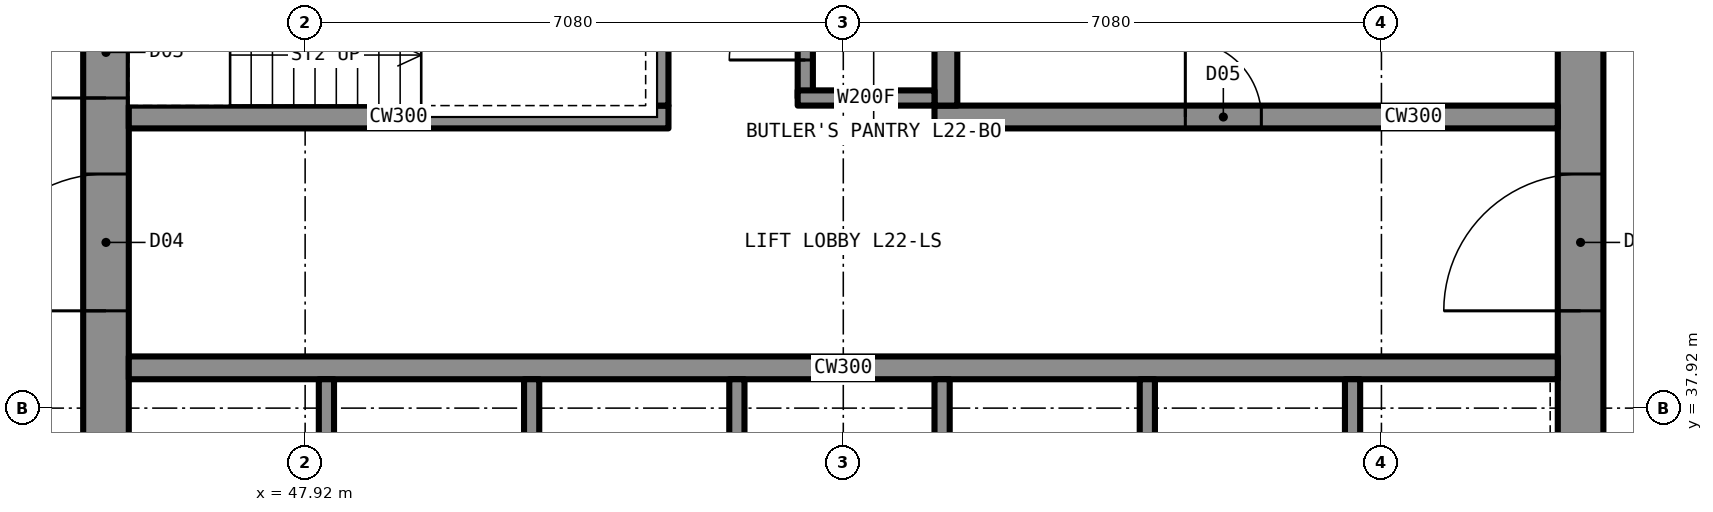
"""IFC4 building model, lengths in metres.
Left out: names, types, materials, properties, quantities, classifications, styles, units other than length and angle.
Written with IfcOpenShell. Run it as: python <this file> out.ifc"""

import sys

from ifc_helpers import new_model, si_unit, direction, frame, frame_2d, origin, place, context, subcontext, project, spatial, rectangle, extrude, element, fill, save


model = new_model("IFC4")
c1 = context("Model", 3, precision=1e-05, world=origin(), true_north=direction((0.0, 1.0)))
c2 = subcontext(c1, "Body", "Model", "MODEL_VIEW")
j1 = project(units=[si_unit("LENGTHUNIT", "METRE"), si_unit("PLANEANGLEUNIT", "RADIAN")], contexts=[c1])
p1 = place(None, origin())
s1 = spatial("IfcSite", under=j1, at=p1, CompositionType="ELEMENT")
p2 = place(p1, origin())
s2 = spatial("IfcBuilding", under=s1, at=p2, CompositionType="ELEMENT")
p3 = place(p2, frame((0.0, 0.0, 81.0)))
s3 = spatial("IfcBuildingStorey", under=s2, at=p3, CompositionType="ELEMENT", Elevation=81.0)
p4 = place(p3, frame((64.7, 35.6, 0.0), z_axis=(0.0, 0.0, 1.0), x_axis=(0.0, 1.0, 0.0)))
e1 = element("IfcWall", 1, at=p4, inside=s3, PredefinedType="SHEAR", context=c2, shape_type="SweptSolid", body=[
    extrude(rectangle(XDim=18.8, YDim=0.6, at=frame_2d((9.4, 0.0))), origin(), (0.0, 0.0, 1.0), 3.5),
])
p5 = place(p4, frame((13.4, 0.0, 0.0)))
e2 = element("IfcOpeningElement", 2, at=p5, cuts=e1, PredefinedType="OPENING", context=c2, shape_type="SweptSolid", body=[
    extrude(rectangle(XDim=1.8, YDim=2.2, at=frame_2d((0.9, 1.1))), frame((0.0, 0.31, 0.0), z_axis=(0.0, -1.0, 0.0), x_axis=(1.0, 0.0, 0.0)), (0.0, 0.0, 1.0), 0.62),
])
p6 = place(p4, frame((3.6, 0.0, 0.0)))
e3 = element("IfcOpeningElement", 3, at=p6, cuts=e1, PredefinedType="OPENING", context=c2, shape_type="SweptSolid", body=[
    extrude(rectangle(XDim=1.8, YDim=2.2, at=frame_2d((0.9, 1.1))), frame((0.0, 0.31, 0.0), z_axis=(0.0, -1.0, 0.0), x_axis=(1.0, 0.0, 0.0)), (0.0, 0.0, 1.0), 0.62),
])
p7 = place(p3, frame((45.3, 35.6, 0.0), z_axis=(0.0, 0.0, 1.0), x_axis=(0.0, 1.0, 0.0)))
e4 = element("IfcWall", 4, at=p7, inside=s3, PredefinedType="SHEAR", context=c2, shape_type="SweptSolid", body=[
    extrude(rectangle(XDim=18.8, YDim=0.6, at=frame_2d((9.4, 0.0))), origin(), (0.0, 0.0, 1.0), 3.5),
])
p8 = place(p7, frame((13.4, 0.0, 0.0)))
e5 = element("IfcOpeningElement", 5, at=p8, cuts=e4, PredefinedType="OPENING", context=c2, shape_type="SweptSolid", body=[
    extrude(rectangle(XDim=1.8, YDim=2.2, at=frame_2d((0.9, 1.1))), frame((0.0, 0.31, 0.0), z_axis=(0.0, -1.0, 0.0), x_axis=(1.0, 0.0, 0.0)), (0.0, 0.0, 1.0), 0.62),
])
p9 = place(p7, frame((3.6, 0.0, 0.0)))
e6 = element("IfcOpeningElement", 6, at=p9, cuts=e4, PredefinedType="OPENING", context=c2, shape_type="SweptSolid", body=[
    extrude(rectangle(XDim=1.8, YDim=2.2, at=frame_2d((0.9, 1.1))), frame((0.0, 0.31, 0.0), z_axis=(0.0, -1.0, 0.0), x_axis=(1.0, 0.0, 0.0)), (0.0, 0.0, 1.0), 0.62),
])
p10 = place(p7, frame((6.4, 0.0, 0.0)))
e7 = element("IfcOpeningElement", 7, at=p10, cuts=e4, PredefinedType="OPENING", context=c2, shape_type="SweptSolid", body=[
    extrude(rectangle(XDim=1.2, YDim=2.2, at=frame_2d((0.6, 1.1))), frame((0.0, 0.31, 0.0), z_axis=(0.0, -1.0, 0.0), x_axis=(1.0, 0.0, 0.0)), (0.0, 0.0, 1.0), 0.62),
])
p11 = place(p3, frame((45.6, 38.45, 0.0), z_axis=(0.0, 0.0, 1.0), x_axis=(1.0, 0.0, 0.0)))
e8 = element("IfcWall", 8, at=p11, inside=s3, PredefinedType="SHEAR", context=c2, shape_type="SweptSolid", body=[
    extrude(rectangle(XDim=18.8, YDim=0.3, at=frame_2d((9.4, 0.0))), origin(), (0.0, 0.0, 1.0), 3.5),
])
p12 = place(p3, frame((45.6, 41.75, 0.0), z_axis=(0.0, 0.0, 1.0), x_axis=(1.0, 0.0, 0.0)))
e9 = element("IfcWall", 9, at=p12, inside=s3, PredefinedType="SHEAR", context=c2, shape_type="SweptSolid", body=[
    extrude(rectangle(XDim=7.1, YDim=0.3, at=frame_2d((3.55, 0.0))), origin(), (0.0, 0.0, 1.0), 3.5),
])
p13 = place(p3, frame((56.2, 41.75, 0.0), z_axis=(0.0, 0.0, 1.0), x_axis=(1.0, 0.0, 0.0)))
e10 = element("IfcWall", 10, at=p13, inside=s3, PredefinedType="SHEAR", context=c2, shape_type="SweptSolid", body=[
    extrude(rectangle(XDim=8.2, YDim=0.3, at=frame_2d((4.1, 0.0))), origin(), (0.0, 0.0, 1.0), 3.5),
])
p14 = place(p13, frame((3.3, 0.0, 0.0)))
e11 = element("IfcOpeningElement", 11, at=p14, cuts=e10, PredefinedType="OPENING", context=c2, shape_type="SweptSolid", body=[
    extrude(rectangle(XDim=1.0, YDim=2.1, at=frame_2d((0.5, 1.05))), frame((0.0, 0.16, 0.0), z_axis=(0.0, -1.0, 0.0), x_axis=(1.0, 0.0, 0.0)), (0.0, 0.0, 1.0), 0.32),
])
p15 = place(p3, frame((52.55, 41.9, 0.0), z_axis=(0.0, 0.0, 1.0), x_axis=(0.0, 1.0, 0.0)))
e12 = element("IfcWall", 12, at=p15, inside=s3, PredefinedType="SHEAR", context=c2, shape_type="SweptSolid", body=[
    extrude(rectangle(XDim=6.2, YDim=0.3, at=frame_2d((3.1, 0.0))), origin(), (0.0, 0.0, 1.0), 3.5),
])
p16 = place(p15, frame((4.125, 0.0, 0.0)))
e13 = element("IfcOpeningElement", 13, at=p16, cuts=e12, PredefinedType="OPENING", context=c2, shape_type="SweptSolid", body=[
    extrude(rectangle(XDim=1.2, YDim=2.2, at=frame_2d((0.6, 1.1))), frame((0.0, 0.16, 0.0), z_axis=(0.0, -1.0, 0.0), x_axis=(1.0, 0.0, 0.0)), (0.0, 0.0, 1.0), 0.32),
])
p17 = place(p3, frame((56.35, 41.9, 0.0), z_axis=(0.0, 0.0, 1.0), x_axis=(0.0, 1.0, 0.0)))
e14 = element("IfcWall", 14, at=p17, inside=s3, PredefinedType="SHEAR", context=c2, shape_type="SweptSolid", body=[
    extrude(rectangle(XDim=9.5, YDim=0.3, at=frame_2d((4.75, 0.0))), origin(), (0.0, 0.0, 1.0), 3.5),
])
p18 = place(p17, frame((7.1, 0.0, 0.0)))
e15 = element("IfcOpeningElement", 15, at=p18, cuts=e14, PredefinedType="OPENING", context=c2, shape_type="SweptSolid", body=[
    extrude(rectangle(XDim=1.8, YDim=2.2, at=frame_2d((0.9, 1.1))), frame((0.0, 0.16, 0.0), z_axis=(0.0, -1.0, 0.0), x_axis=(1.0, 0.0, 0.0)), (0.0, 0.0, 1.0), 0.32),
])
p19 = place(p3, frame((54.5, 42.0, 0.0), z_axis=(0.0, 0.0, 1.0), x_axis=(0.0, 1.0, 0.0)))
e16 = element("IfcWall", 16, at=p19, inside=s3, PredefinedType="PARTITIONING", context=c2, shape_type="SweptSolid", body=[
    extrude(rectangle(XDim=3.1, YDim=0.2, at=frame_2d((1.55, 0.0))), origin(), (0.0, 0.0, 1.0), 3.33),
])
p20 = place(p19, frame((1.05, 0.0, 0.0)))
e17 = element("IfcOpeningElement", 17, at=p20, cuts=e16, PredefinedType="OPENING", context=c2, shape_type="SweptSolid", body=[
    extrude(rectangle(XDim=1.0, YDim=2.1, at=frame_2d((0.5, 1.05))), frame((0.0, 0.11, 0.0), z_axis=(0.0, -1.0, 0.0), x_axis=(1.0, 0.0, 0.0)), (0.0, 0.0, 1.0), 0.22),
])
p21 = place(p3, frame((54.4, 42.0, 0.0), z_axis=(0.0, 0.0, 1.0), x_axis=(1.0, 0.0, 0.0)))
e18 = element("IfcWall", 18, at=p21, inside=s3, PredefinedType="PARTITIONING", context=c2, shape_type="SweptSolid", body=[
    extrude(rectangle(XDim=1.8, YDim=0.2, at=frame_2d((0.9, 0.0))), origin(), (0.0, 0.0, 1.0), 3.33),
])
for number, where, z_axis, x_axis in (
    (19, (48.2, 35.6, 0.0), (0.0, 0.0, 1.0), (0.0, 1.0, 0.0)),
    (20, (50.9, 35.6, 0.0), (0.0, 0.0, 1.0), (0.0, 1.0, 0.0)),
    (21, (53.6, 35.6, 0.0), (0.0, 0.0, 1.0), (0.0, 1.0, 0.0)),
    (22, (56.3, 35.6, 0.0), (0.0, 0.0, 1.0), (0.0, 1.0, 0.0)),
    (23, (59.0, 35.6, 0.0), (0.0, 0.0, 1.0), (0.0, 1.0, 0.0)),
    (24, (61.7, 35.6, 0.0), (0.0, 0.0, 1.0), (0.0, 1.0, 0.0)),
):
    element("IfcWall", number, at=place(p3, frame(where, z_axis=z_axis, x_axis=x_axis)), inside=s3, PredefinedType="PARTITIONING", context=c2, shape_type="SweptSolid", body=[
        extrude(rectangle(XDim=2.7, YDim=0.2, at=frame_2d((1.35, 0.0))), origin(), (0.0, 0.0, 1.0), 3.33),
    ])
p22 = place(p9, origin())
e25 = element("IfcDoor", 25, at=p22, inside=s3, OperationType="DOUBLE_DOOR_SINGLE_SWING", PredefinedType="DOOR", context=c2, shape_type="SweptSolid", body=[
    extrude(rectangle(XDim=1.8, YDim=2.2, at=frame_2d((0.9, 1.1))), frame((0.0, 0.025, 0.0), z_axis=(0.0, -1.0, 0.0), x_axis=(1.0, 0.0, 0.0)), (0.0, 0.0, 1.0), 0.05),
])
fill(e6, e25)
p23 = place(p6, origin())
e26 = element("IfcDoor", 26, at=p23, inside=s3, OperationType="DOUBLE_DOOR_SINGLE_SWING", PredefinedType="DOOR", context=c2, shape_type="SweptSolid", body=[
    extrude(rectangle(XDim=1.8, YDim=2.2, at=frame_2d((0.9, 1.1))), frame((0.0, 0.025, 0.0), z_axis=(0.0, -1.0, 0.0), x_axis=(1.0, 0.0, 0.0)), (0.0, 0.0, 1.0), 0.05),
])
fill(e3, e26)
p24 = place(p10, origin())
e27 = element("IfcDoor", 27, at=p24, inside=s3, OperationType="SINGLE_SWING_LEFT", PredefinedType="DOOR", context=c2, shape_type="SweptSolid", body=[
    extrude(rectangle(XDim=1.2, YDim=2.2, at=frame_2d((0.6, 1.1))), frame((0.0, 0.025, 0.0), z_axis=(0.0, -1.0, 0.0), x_axis=(1.0, 0.0, 0.0)), (0.0, 0.0, 1.0), 0.05),
])
fill(e7, e27)
p25 = place(p14, origin())
e28 = element("IfcDoor", 28, at=p25, inside=s3, OperationType="SINGLE_SWING_LEFT", PredefinedType="DOOR", context=c2, shape_type="SweptSolid", body=[
    extrude(rectangle(XDim=1.0, YDim=2.1, at=frame_2d((0.5, 1.05))), frame((0.0, 0.025, 0.0), z_axis=(0.0, -1.0, 0.0), x_axis=(1.0, 0.0, 0.0)), (0.0, 0.0, 1.0), 0.05),
])
fill(e11, e28)
save(model, sys.argv[1])
